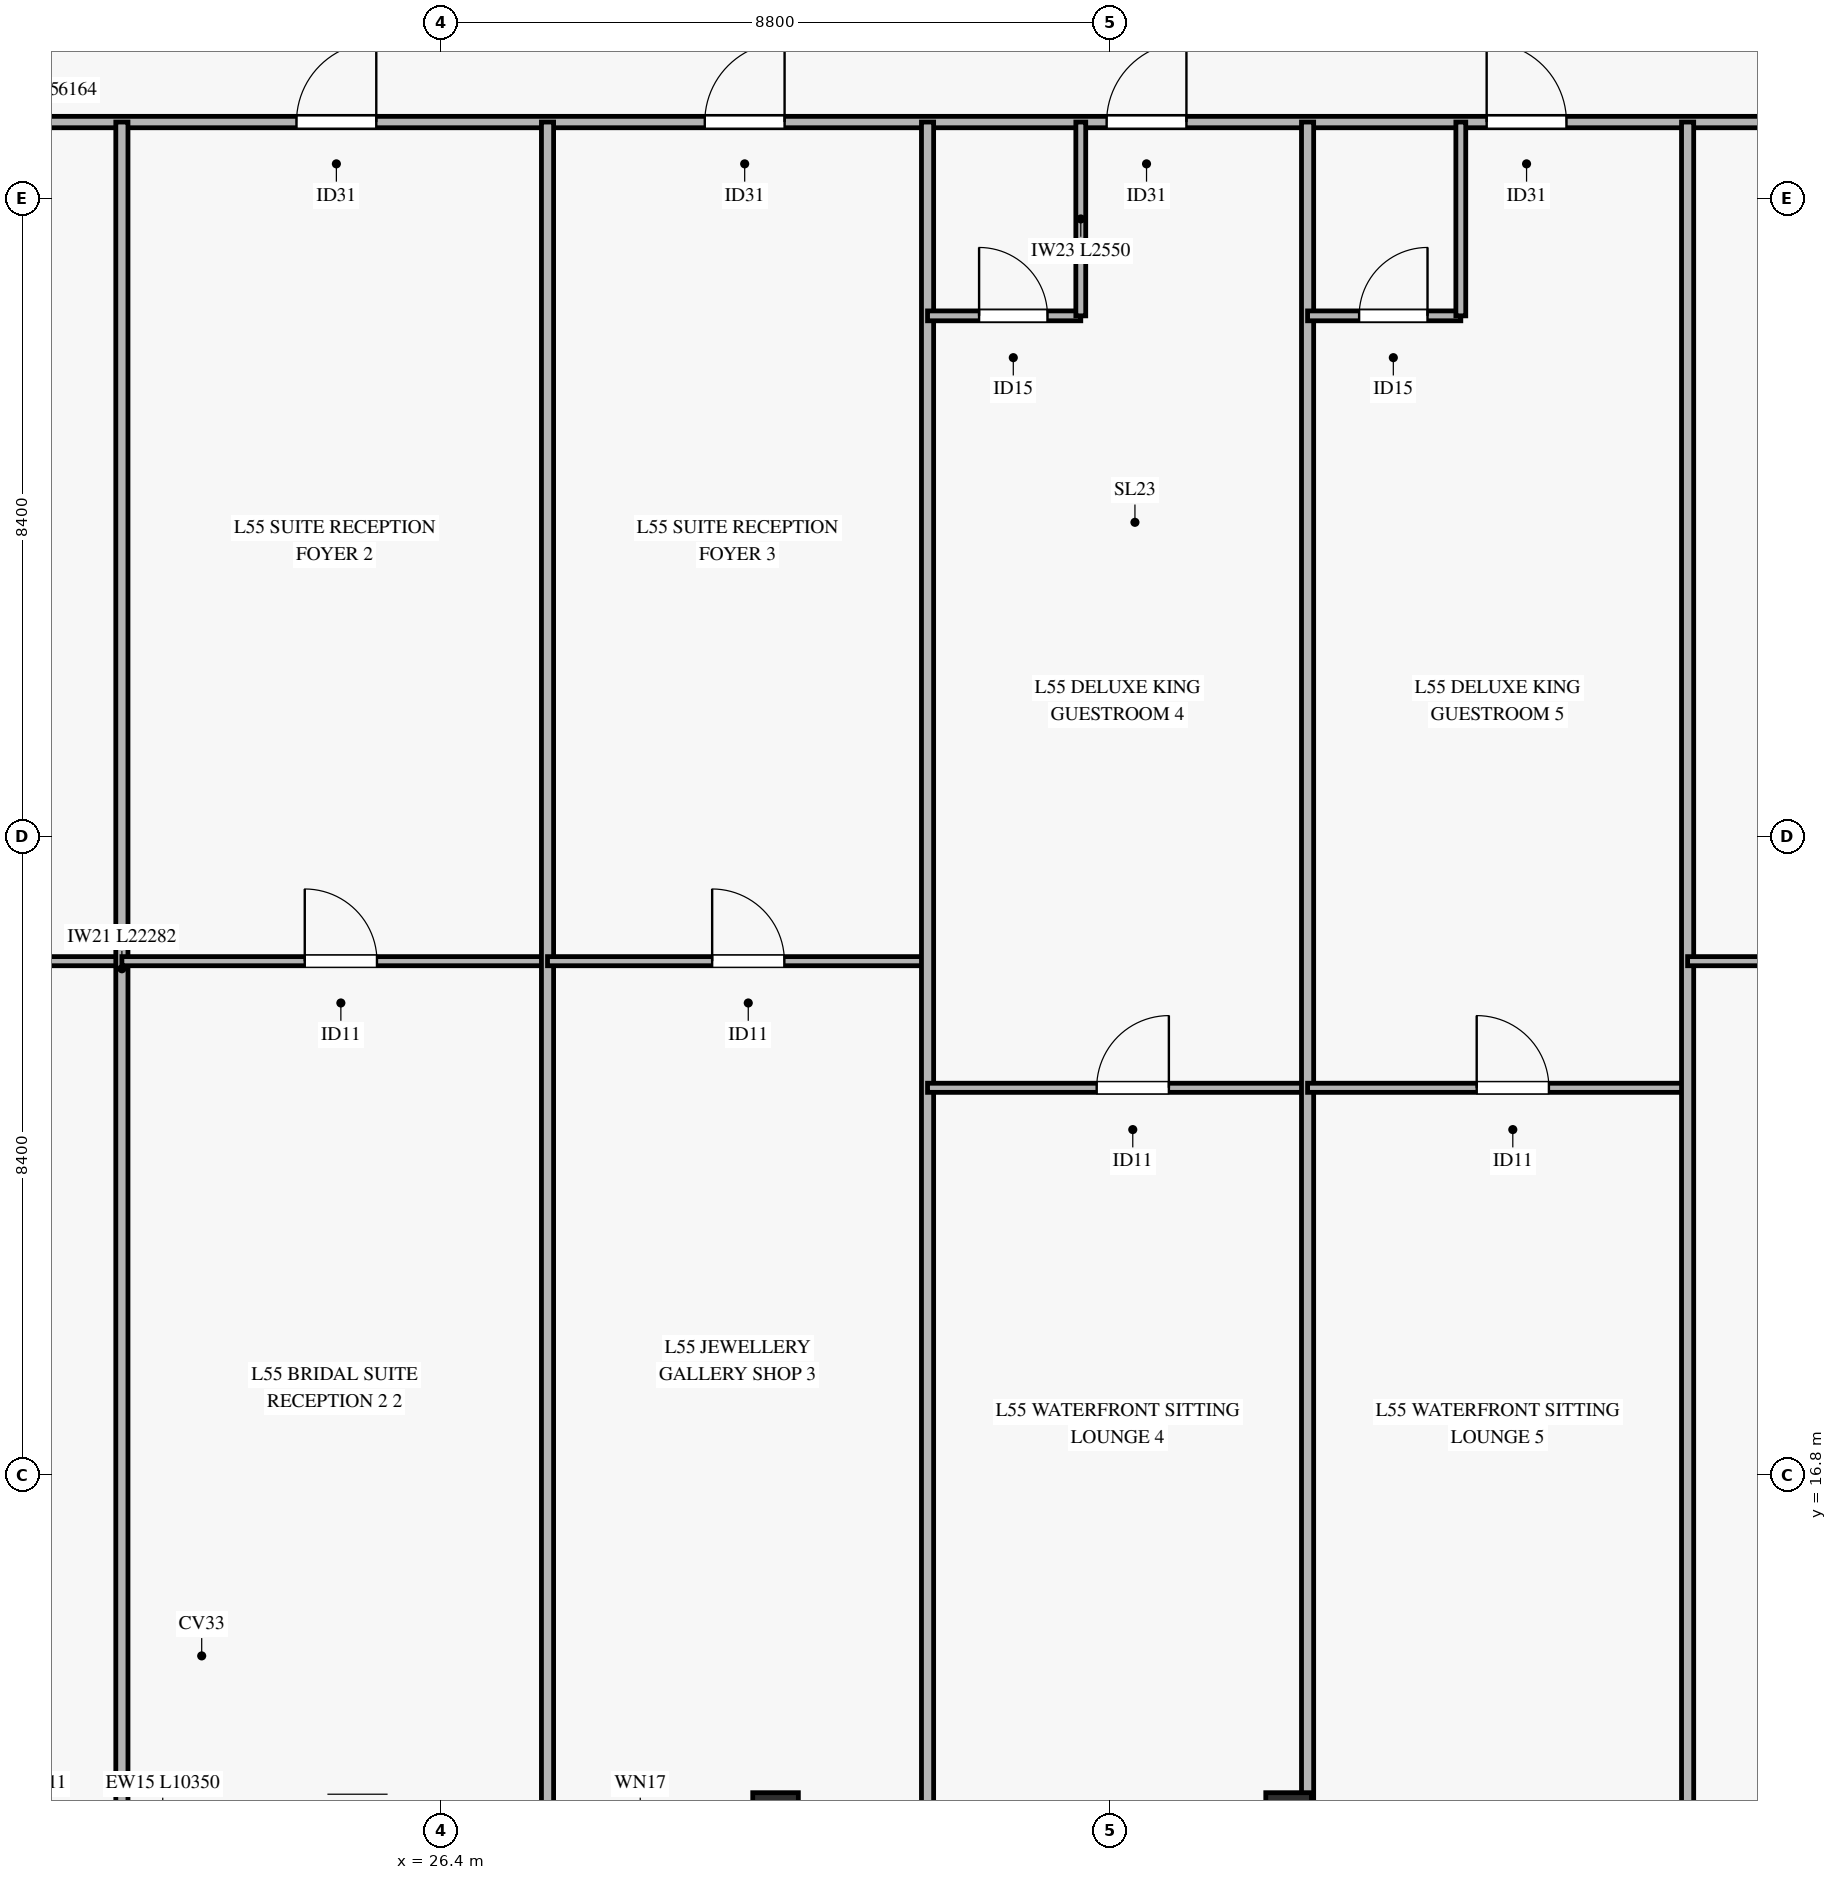
"""IFC4 building model, lengths in metres.
Left out: names, types, materials, properties, quantities, classifications, styles, units other than length and angle.
Written with IfcOpenShell. Run it as: python <this file> out.ifc"""

import sys

from ifc_helpers import new_model, si_unit, direction, frame, frame_2d, origin, origin_2d, place, context, subcontext, project, spatial, rectangle, hollow_rectangle, extrude, source, transform, mapped, element, fill, save


model = new_model("IFC4")
c1 = context("Model", 3, precision=1e-05, world=origin(), true_north=direction((0.0, 1.0)))
c2 = subcontext(c1, "Body", "Model", "MODEL_VIEW")
j1 = project(units=[si_unit("LENGTHUNIT", "METRE"), si_unit("PLANEANGLEUNIT", "RADIAN")], contexts=[c1])
p1 = place(None, origin())
s1 = spatial("IfcSite", under=j1, at=p1, CompositionType="ELEMENT")
p2 = place(p1, origin())
s2 = spatial("IfcBuilding", under=s1, at=p2, CompositionType="ELEMENT")
p3 = place(p2, frame((0.0, 0.0, 216.7)))
s3 = spatial("IfcBuildingStorey", under=s2, at=p3, CompositionType="ELEMENT", Elevation=216.7)
m1 = source(origin(), c2, "Body", "SweptSolid", [
    extrude(hollow_rectangle(XDim=0.6, YDim=0.6, WallThickness=0.028, at=origin_2d()), origin(), (0.0, 0.0, 1.0), 3.24),
])
for number, where, z_axis, x_axis in (
    (1, (30.8, 12.318, 0.0), (0.0, 0.0, 1.0), (1.0, 0.0, 0.0)),
    (2, (37.55, 12.318, 0.0), (0.0, 0.0, 1.0), (1.0, 0.0, 0.0)),
):
    element("IfcColumn", number, at=place(p3, frame(where, z_axis=z_axis, x_axis=x_axis)), inside=s3, PredefinedType="COLUMN", context=c2, shape_type="MappedRepresentation", body=[
        mapped(m1, transform((0.0, 0.0, 0.0), x_axis=(1.0, 0.0, 0.0), y_axis=(0.0, 1.0, 0.0), z_axis=(0.0, 0.0, 1.0), scale=1.0)),
    ])
p4 = place(p3, frame((7.118, 34.6, 0.0), z_axis=(0.0, 0.0, 1.0), x_axis=(1.0, 0.0, 0.0)))
e3 = element("IfcWall", 3, at=p4, inside=s3, PredefinedType="PARTITIONING", context=c2, shape_type="SweptSolid", body=[
    extrude(rectangle(XDim=56.164, YDim=0.15, at=frame_2d((28.082, 0.0))), origin(), (0.0, 0.0, 1.0), 2.425),
])
p5 = place(p4, frame((6.024, 0.0, 0.0)))
e4 = element("IfcOpeningElement", 4, at=p5, cuts=e3, PredefinedType="OPENING", context=c2, shape_type="SweptSolid", body=[
    extrude(rectangle(XDim=1.05, YDim=2.15, at=frame_2d((0.525, 1.075))), frame((0.0, 0.085, 0.0), z_axis=(0.0, -1.0, 0.0), x_axis=(1.0, 0.0, 0.0)), (0.0, 0.0, 1.0), 0.17),
])
p6 = place(p4, frame((17.379, 0.0, 0.0)))
e5 = element("IfcOpeningElement", 5, at=p6, cuts=e3, PredefinedType="OPENING", context=c2, shape_type="SweptSolid", body=[
    extrude(rectangle(XDim=1.05, YDim=2.15, at=frame_2d((0.525, 1.075))), frame((0.0, 0.085, 0.0), z_axis=(0.0, -1.0, 0.0), x_axis=(1.0, 0.0, 0.0)), (0.0, 0.0, 1.0), 0.17),
])
p7 = place(p4, frame((22.751, 0.0, 0.0)))
e6 = element("IfcOpeningElement", 6, at=p7, cuts=e3, PredefinedType="OPENING", context=c2, shape_type="SweptSolid", body=[
    extrude(rectangle(XDim=1.05, YDim=2.15, at=frame_2d((0.525, 1.075))), frame((0.0, 0.085, 0.0), z_axis=(0.0, -1.0, 0.0), x_axis=(1.0, 0.0, 0.0)), (0.0, 0.0, 1.0), 0.17),
])
p8 = place(p4, frame((28.038, 0.0, 0.0)))
e7 = element("IfcOpeningElement", 7, at=p8, cuts=e3, PredefinedType="OPENING", context=c2, shape_type="SweptSolid", body=[
    extrude(rectangle(XDim=1.05, YDim=2.15, at=frame_2d((0.525, 1.075))), frame((0.0, 0.085, 0.0), z_axis=(0.0, -1.0, 0.0), x_axis=(1.0, 0.0, 0.0)), (0.0, 0.0, 1.0), 0.17),
])
p9 = place(p4, frame((33.038, 0.0, 0.0)))
e8 = element("IfcOpeningElement", 8, at=p9, cuts=e3, PredefinedType="OPENING", context=c2, shape_type="SweptSolid", body=[
    extrude(rectangle(XDim=1.05, YDim=2.15, at=frame_2d((0.525, 1.075))), frame((0.0, 0.085, 0.0), z_axis=(0.0, -1.0, 0.0), x_axis=(1.0, 0.0, 0.0)), (0.0, 0.0, 1.0), 0.17),
])
p10 = place(p4, frame((43.558, 0.0, 0.0)))
e9 = element("IfcOpeningElement", 9, at=p10, cuts=e3, PredefinedType="OPENING", context=c2, shape_type="SweptSolid", body=[
    extrude(rectangle(XDim=1.05, YDim=2.15, at=frame_2d((0.525, 1.075))), frame((0.0, 0.085, 0.0), z_axis=(0.0, -1.0, 0.0), x_axis=(1.0, 0.0, 0.0)), (0.0, 0.0, 1.0), 0.17),
])
p11 = place(p3, frame((7.118, 23.559, 0.0), z_axis=(0.0, 0.0, 1.0), x_axis=(1.0, 0.0, 0.0)))
e10 = element("IfcWall", 10, at=p11, inside=s3, PredefinedType="PARTITIONING", context=c2, shape_type="SweptSolid", body=[
    extrude(rectangle(XDim=15.082, YDim=0.12, at=frame_2d((7.541, 0.0))), origin(), (0.0, 0.0, 1.0), 2.425),
])
p12 = place(p11, frame((6.319, 0.0, 0.0)))
e11 = element("IfcOpeningElement", 11, at=p12, cuts=e10, PredefinedType="OPENING", context=c2, shape_type="SweptSolid", body=[
    extrude(rectangle(XDim=0.95, YDim=2.1, at=frame_2d((0.475, 1.05))), frame((0.0, 0.07, 0.0), z_axis=(0.0, -1.0, 0.0), x_axis=(1.0, 0.0, 0.0)), (0.0, 0.0, 1.0), 0.14),
])
p13 = place(p3, frame((22.2, 12.318, 0.0), z_axis=(0.0, 0.0, 1.0), x_axis=(0.0, 1.0, 0.0)))
e12 = element("IfcWall", 12, at=p13, inside=s3, PredefinedType="PARTITIONING", context=c2, shape_type="SweptSolid", body=[
    extrude(rectangle(XDim=22.282, YDim=0.16, at=frame_2d((11.141, 0.0))), origin(), (0.0, 0.0, 1.0), 2.725),
])
p14 = place(p3, frame((22.2, 23.559, 0.0), z_axis=(0.0, 0.0, 1.0), x_axis=(1.0, 0.0, 0.0)))
e13 = element("IfcWall", 13, at=p14, inside=s3, PredefinedType="PARTITIONING", context=c2, shape_type="SweptSolid", body=[
    extrude(rectangle(XDim=5.6, YDim=0.12, at=frame_2d((2.8, 0.0))), origin(), (0.0, 0.0, 1.0), 3.24),
])
p15 = place(p14, frame((2.406, 0.0, 0.0)))
e14 = element("IfcOpeningElement", 14, at=p15, cuts=e13, PredefinedType="OPENING", context=c2, shape_type="SweptSolid", body=[
    extrude(rectangle(XDim=0.95, YDim=2.1, at=frame_2d((0.475, 1.05))), frame((0.0, 0.07, 0.0), z_axis=(0.0, -1.0, 0.0), x_axis=(1.0, 0.0, 0.0)), (0.0, 0.0, 1.0), 0.14),
])
p16 = place(p3, frame((27.8, 12.318, 0.0), z_axis=(0.0, 0.0, 1.0), x_axis=(0.0, 1.0, 0.0)))
e15 = element("IfcWall", 15, at=p16, inside=s3, PredefinedType="PARTITIONING", context=c2, shape_type="SweptSolid", body=[
    extrude(rectangle(XDim=22.282, YDim=0.16, at=frame_2d((11.141, 0.0))), origin(), (0.0, 0.0, 1.0), 2.725),
])
p17 = place(p3, frame((27.8, 23.559, 0.0), z_axis=(0.0, 0.0, 1.0), x_axis=(1.0, 0.0, 0.0)))
e16 = element("IfcWall", 16, at=p17, inside=s3, PredefinedType="PARTITIONING", context=c2, shape_type="SweptSolid", body=[
    extrude(rectangle(XDim=5.0, YDim=0.12, at=frame_2d((2.5, 0.0))), origin(), (0.0, 0.0, 1.0), 2.425),
])
p18 = place(p17, frame((2.166, 0.0, 0.0)))
e17 = element("IfcOpeningElement", 17, at=p18, cuts=e16, PredefinedType="OPENING", context=c2, shape_type="SweptSolid", body=[
    extrude(rectangle(XDim=0.95, YDim=2.1, at=frame_2d((0.475, 1.05))), frame((0.0, 0.07, 0.0), z_axis=(0.0, -1.0, 0.0), x_axis=(1.0, 0.0, 0.0)), (0.0, 0.0, 1.0), 0.14),
])
p19 = place(p3, frame((32.8, 12.318, 0.0), z_axis=(0.0, 0.0, 1.0), x_axis=(0.0, 1.0, 0.0)))
e18 = element("IfcWall", 18, at=p19, inside=s3, PredefinedType="PARTITIONING", context=c2, shape_type="SweptSolid", body=[
    extrude(rectangle(XDim=22.282, YDim=0.16, at=frame_2d((11.141, 0.0))), origin(), (0.0, 0.0, 1.0), 2.725),
])
p20 = place(p3, frame((32.8, 32.05, 0.0), z_axis=(0.0, 0.0, 1.0), x_axis=(1.0, 0.0, 0.0)))
e19 = element("IfcWall", 19, at=p20, inside=s3, PredefinedType="PARTITIONING", context=c2, shape_type="SweptSolid", body=[
    extrude(rectangle(XDim=2.016, YDim=0.13, at=frame_2d((1.008, 0.0))), origin(), (0.0, 0.0, 1.0), 3.24),
])
p21 = place(p20, frame((0.678, 0.0, 0.0)))
e20 = element("IfcOpeningElement", 20, at=p21, cuts=e19, PredefinedType="OPENING", context=c2, shape_type="SweptSolid", body=[
    extrude(rectangle(XDim=0.9, YDim=2.1, at=frame_2d((0.45, 1.05))), frame((0.0, 0.075, 0.0), z_axis=(0.0, -1.0, 0.0), x_axis=(1.0, 0.0, 0.0)), (0.0, 0.0, 1.0), 0.15),
])
p22 = place(p3, frame((34.816, 32.05, 0.0), z_axis=(0.0, 0.0, 1.0), x_axis=(0.0, 1.0, 0.0)))
e21 = element("IfcWall", 21, at=p22, inside=s3, PredefinedType="PARTITIONING", context=c2, shape_type="SweptSolid", body=[
    extrude(rectangle(XDim=2.55, YDim=0.13, at=frame_2d((1.275, 0.0))), origin(), (0.0, 0.0, 1.0), 2.825),
])
p23 = place(p3, frame((32.8, 21.893, 0.0), z_axis=(0.0, 0.0, 1.0), x_axis=(1.0, 0.0, 0.0)))
e22 = element("IfcWall", 22, at=p23, inside=s3, PredefinedType="PARTITIONING", context=c2, shape_type="SweptSolid", body=[
    extrude(rectangle(XDim=5.0, YDim=0.12, at=frame_2d((2.5, 0.0))), origin(), (0.0, 0.0, 1.0), 2.425),
])
p24 = place(p23, frame((2.225, 0.0, 0.0)))
e23 = element("IfcOpeningElement", 23, at=p24, cuts=e22, PredefinedType="OPENING", context=c2, shape_type="SweptSolid", body=[
    extrude(rectangle(XDim=0.95, YDim=2.1, at=frame_2d((0.475, 1.05))), frame((0.0, 0.07, 0.0), z_axis=(0.0, -1.0, 0.0), x_axis=(1.0, 0.0, 0.0)), (0.0, 0.0, 1.0), 0.14),
])
p25 = place(p3, frame((37.8, 12.318, 0.0), z_axis=(0.0, 0.0, 1.0), x_axis=(0.0, 1.0, 0.0)))
e24 = element("IfcWall", 24, at=p25, inside=s3, PredefinedType="PARTITIONING", context=c2, shape_type="SweptSolid", body=[
    extrude(rectangle(XDim=22.282, YDim=0.16, at=frame_2d((11.141, 0.0))), origin(), (0.0, 0.0, 1.0), 2.425),
])
p26 = place(p3, frame((37.8, 32.05, 0.0), z_axis=(0.0, 0.0, 1.0), x_axis=(1.0, 0.0, 0.0)))
e25 = element("IfcWall", 25, at=p26, inside=s3, PredefinedType="PARTITIONING", context=c2, shape_type="SweptSolid", body=[
    extrude(rectangle(XDim=2.016, YDim=0.13, at=frame_2d((1.008, 0.0))), origin(), (0.0, 0.0, 1.0), 3.24),
])
p27 = place(p26, frame((0.678, 0.0, 0.0)))
e26 = element("IfcOpeningElement", 26, at=p27, cuts=e25, PredefinedType="OPENING", context=c2, shape_type="SweptSolid", body=[
    extrude(rectangle(XDim=0.9, YDim=2.1, at=frame_2d((0.45, 1.05))), frame((0.0, 0.075, 0.0), z_axis=(0.0, -1.0, 0.0), x_axis=(1.0, 0.0, 0.0)), (0.0, 0.0, 1.0), 0.15),
])
p28 = place(p3, frame((39.816, 32.05, 0.0), z_axis=(0.0, 0.0, 1.0), x_axis=(0.0, 1.0, 0.0)))
e27 = element("IfcWall", 27, at=p28, inside=s3, PredefinedType="PARTITIONING", context=c2, shape_type="SweptSolid", body=[
    extrude(rectangle(XDim=2.55, YDim=0.13, at=frame_2d((1.275, 0.0))), origin(), (0.0, 0.0, 1.0), 2.825),
])
p29 = place(p3, frame((37.8, 21.893, 0.0), z_axis=(0.0, 0.0, 1.0), x_axis=(1.0, 0.0, 0.0)))
e28 = element("IfcWall", 28, at=p29, inside=s3, PredefinedType="PARTITIONING", context=c2, shape_type="SweptSolid", body=[
    extrude(rectangle(XDim=5.0, YDim=0.12, at=frame_2d((2.5, 0.0))), origin(), (0.0, 0.0, 1.0), 3.24),
])
p30 = place(p29, frame((2.225, 0.0, 0.0)))
e29 = element("IfcOpeningElement", 29, at=p30, cuts=e28, PredefinedType="OPENING", context=c2, shape_type="SweptSolid", body=[
    extrude(rectangle(XDim=0.95, YDim=2.1, at=frame_2d((0.475, 1.05))), frame((0.0, 0.07, 0.0), z_axis=(0.0, -1.0, 0.0), x_axis=(1.0, 0.0, 0.0)), (0.0, 0.0, 1.0), 0.14),
])
p31 = place(p3, frame((42.8, 12.318, 0.0), z_axis=(0.0, 0.0, 1.0), x_axis=(0.0, 1.0, 0.0)))
e30 = element("IfcWall", 30, at=p31, inside=s3, PredefinedType="PARTITIONING", context=c2, shape_type="SweptSolid", body=[
    extrude(rectangle(XDim=22.282, YDim=0.16, at=frame_2d((11.141, 0.0))), origin(), (0.0, 0.0, 1.0), 2.725),
])
p32 = place(p3, frame((42.8, 23.559, 0.0), z_axis=(0.0, 0.0, 1.0), x_axis=(1.0, 0.0, 0.0)))
e31 = element("IfcWall", 31, at=p32, inside=s3, PredefinedType="PARTITIONING", context=c2, shape_type="SweptSolid", body=[
    extrude(rectangle(XDim=20.482, YDim=0.12, at=frame_2d((10.241, 0.0))), origin(), (0.0, 0.0, 1.0), 2.425),
])
p33 = place(p32, frame((8.279, 0.0, 0.0)))
e32 = element("IfcOpeningElement", 32, at=p33, cuts=e31, PredefinedType="OPENING", context=c2, shape_type="SweptSolid", body=[
    extrude(rectangle(XDim=0.95, YDim=2.1, at=frame_2d((0.475, 1.05))), frame((0.0, 0.07, 0.0), z_axis=(0.0, -1.0, 0.0), x_axis=(1.0, 0.0, 0.0)), (0.0, 0.0, 1.0), 0.14),
])
m2 = source(origin(), c2, "Body", "SweptSolid", [
    extrude(rectangle(XDim=1.05, YDim=2.15, at=frame_2d((0.525, 1.075))), frame((0.0, 0.025, 0.0), z_axis=(0.0, -1.0, 0.0), x_axis=(1.0, 0.0, 0.0)), (0.0, 0.0, 1.0), 0.05),
])
p34 = place(p6, origin())
e33 = element("IfcDoor", 33, at=p34, inside=s3, OperationType="SINGLE_SWING_RIGHT", PredefinedType="DOOR", context=c2, shape_type="MappedRepresentation", body=[
    mapped(m2, transform((0.0, 0.0, 0.0), x_axis=(1.0, 0.0, 0.0), y_axis=(0.0, 1.0, 0.0), z_axis=(0.0, 0.0, 1.0), scale=1.0)),
])
fill(e5, e33)
m3 = source(origin(), c2, "Body", "SweptSolid", [
    extrude(rectangle(XDim=0.95, YDim=2.1, at=frame_2d((0.475, 1.05))), frame((0.0, 0.025, 0.0), z_axis=(0.0, -1.0, 0.0), x_axis=(1.0, 0.0, 0.0)), (0.0, 0.0, 1.0), 0.05),
])
p35 = place(p15, origin())
e34 = element("IfcDoor", 34, at=p35, inside=s3, OperationType="SINGLE_SWING_LEFT", PredefinedType="DOOR", context=c2, shape_type="MappedRepresentation", body=[
    mapped(m3, transform((0.0, 0.0, 0.0), x_axis=(1.0, 0.0, 0.0), y_axis=(0.0, 1.0, 0.0), z_axis=(0.0, 0.0, 1.0), scale=1.0)),
])
fill(e14, e34)
p36 = place(p7, origin())
e35 = element("IfcDoor", 35, at=p36, inside=s3, OperationType="SINGLE_SWING_RIGHT", PredefinedType="DOOR", context=c2, shape_type="MappedRepresentation", body=[
    mapped(m2, transform((0.0, 0.0, 0.0), x_axis=(1.0, 0.0, 0.0), y_axis=(0.0, 1.0, 0.0), z_axis=(0.0, 0.0, 1.0), scale=1.0)),
])
fill(e6, e35)
p37 = place(p18, origin())
e36 = element("IfcDoor", 36, at=p37, inside=s3, OperationType="SINGLE_SWING_LEFT", PredefinedType="DOOR", context=c2, shape_type="MappedRepresentation", body=[
    mapped(m3, transform((0.0, 0.0, 0.0), x_axis=(1.0, 0.0, 0.0), y_axis=(0.0, 1.0, 0.0), z_axis=(0.0, 0.0, 1.0), scale=1.0)),
])
fill(e17, e36)
p38 = place(p8, origin())
e37 = element("IfcDoor", 37, at=p38, inside=s3, OperationType="SINGLE_SWING_RIGHT", PredefinedType="DOOR", context=c2, shape_type="MappedRepresentation", body=[
    mapped(m2, transform((0.0, 0.0, 0.0), x_axis=(1.0, 0.0, 0.0), y_axis=(0.0, 1.0, 0.0), z_axis=(0.0, 0.0, 1.0), scale=1.0)),
])
fill(e7, e37)
m4 = source(origin(), c2, "Body", "SweptSolid", [
    extrude(rectangle(XDim=0.9, YDim=2.1, at=frame_2d((0.45, 1.05))), frame((0.0, 0.025, 0.0), z_axis=(0.0, -1.0, 0.0), x_axis=(1.0, 0.0, 0.0)), (0.0, 0.0, 1.0), 0.05),
])
p39 = place(p21, origin())
e38 = element("IfcDoor", 38, at=p39, inside=s3, OperationType="SINGLE_SWING_LEFT", PredefinedType="DOOR", context=c2, shape_type="MappedRepresentation", body=[
    mapped(m4, transform((0.0, 0.0, 0.0), x_axis=(1.0, 0.0, 0.0), y_axis=(0.0, 1.0, 0.0), z_axis=(0.0, 0.0, 1.0), scale=1.0)),
])
fill(e20, e38)
p40 = place(p24, origin())
e39 = element("IfcDoor", 39, at=p40, inside=s3, OperationType="SINGLE_SWING_RIGHT", PredefinedType="DOOR", context=c2, shape_type="MappedRepresentation", body=[
    mapped(m3, transform((0.0, 0.0, 0.0), x_axis=(1.0, 0.0, 0.0), y_axis=(0.0, 1.0, 0.0), z_axis=(0.0, 0.0, 1.0), scale=1.0)),
])
fill(e23, e39)
p41 = place(p9, origin())
e40 = element("IfcDoor", 40, at=p41, inside=s3, OperationType="SINGLE_SWING_LEFT", PredefinedType="DOOR", context=c2, shape_type="MappedRepresentation", body=[
    mapped(m2, transform((0.0, 0.0, 0.0), x_axis=(1.0, 0.0, 0.0), y_axis=(0.0, 1.0, 0.0), z_axis=(0.0, 0.0, 1.0), scale=1.0)),
])
fill(e8, e40)
p42 = place(p27, origin())
e41 = element("IfcDoor", 41, at=p42, inside=s3, OperationType="SINGLE_SWING_RIGHT", PredefinedType="DOOR", context=c2, shape_type="MappedRepresentation", body=[
    mapped(m4, transform((0.0, 0.0, 0.0), x_axis=(1.0, 0.0, 0.0), y_axis=(0.0, 1.0, 0.0), z_axis=(0.0, 0.0, 1.0), scale=1.0)),
])
fill(e26, e41)
p43 = place(p30, origin())
e42 = element("IfcDoor", 42, at=p43, inside=s3, OperationType="SINGLE_SWING_LEFT", PredefinedType="DOOR", context=c2, shape_type="MappedRepresentation", body=[
    mapped(m3, transform((0.0, 0.0, 0.0), x_axis=(1.0, 0.0, 0.0), y_axis=(0.0, 1.0, 0.0), z_axis=(0.0, 0.0, 1.0), scale=1.0)),
])
fill(e29, e42)
save(model, sys.argv[1])
